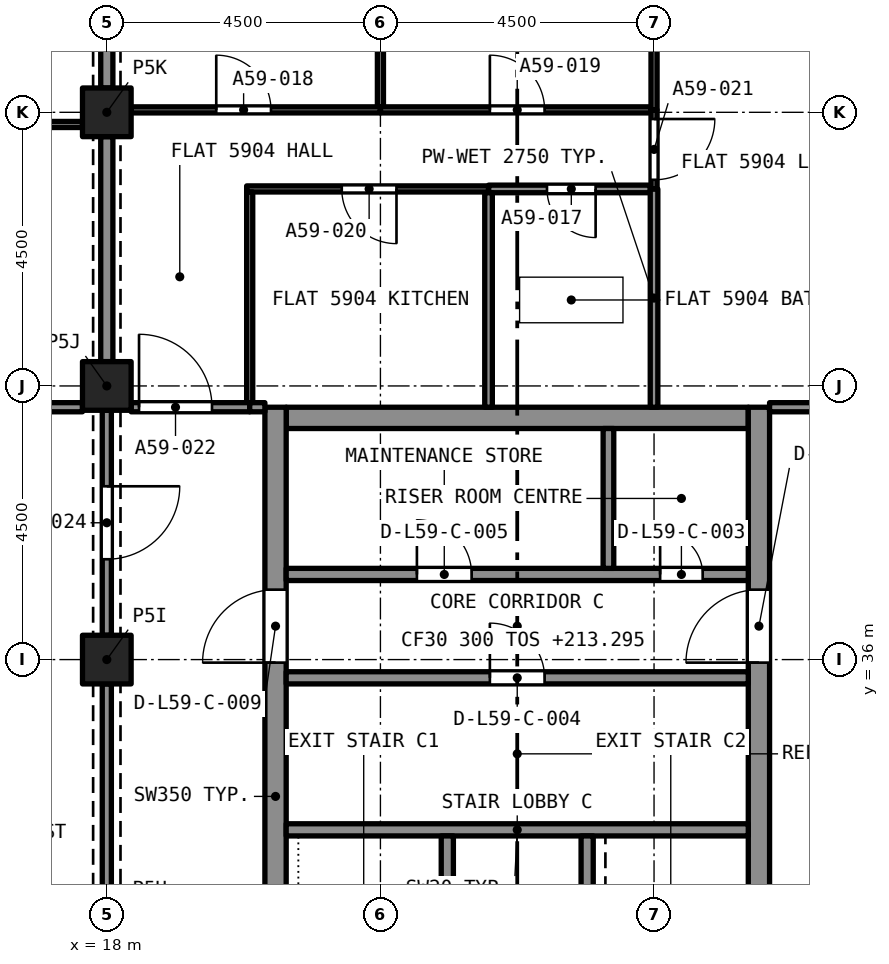
"""IFC4 building model, lengths in metres.
Left out: names, types, materials, properties, quantities, classifications, styles, units other than length and angle.
Written with IfcOpenShell. Run it as: python <this file> out.ifc"""

import sys

from ifc_helpers import new_model, si_unit, direction, frame, frame_2d, origin, origin_2d, place, context, subcontext, project, spatial, rectangle, extrude, element, fill, save


model = new_model("IFC4")
c1 = context("Model", 3, precision=1e-05, world=origin(), true_north=direction((0.0, 1.0)))
c2 = subcontext(c1, "Body", "Model", "MODEL_VIEW")
j1 = project(units=[si_unit("LENGTHUNIT", "METRE"), si_unit("PLANEANGLEUNIT", "RADIAN")], contexts=[c1])
p1 = place(None, origin())
s1 = spatial("IfcSite", under=j1, at=p1, CompositionType="ELEMENT")
p2 = place(p1, origin())
s2 = spatial("IfcBuilding", under=s1, at=p2, CompositionType="ELEMENT")
p3 = place(p2, frame((0.0, 0.0, 213.295)))
s3 = spatial("IfcBuildingStorey", under=s2, at=p3, CompositionType="ELEMENT", Elevation=213.295)
for number, where, z_axis, x_axis in (
    (1, (18.0, 36.0, 0.0), (0.0, 0.0, 1.0), (1.0, 0.0, 0.0)),
    (2, (18.0, 40.5, 0.0), (0.0, 0.0, 1.0), (1.0, 0.0, 0.0)),
    (3, (18.0, 45.0, 0.0), (0.0, 0.0, 1.0), (1.0, 0.0, 0.0)),
):
    element("IfcColumn", number, at=place(p3, frame(where, z_axis=z_axis, x_axis=x_axis)), inside=s3, PredefinedType="COLUMN", context=c2, shape_type="SweptSolid", body=[
        extrude(rectangle(XDim=0.8, YDim=0.8, at=origin_2d()), origin(), (0.0, 0.0, 1.0), 3.2),
    ])
p4 = place(p3, frame((20.95, 39.975, 0.0), z_axis=(0.0, 0.0, 1.0), x_axis=(1.0, 0.0, 0.0)))
e4 = element("IfcWall", 4, at=p4, inside=s3, PredefinedType="SOLIDWALL", context=c2, shape_type="SweptSolid", body=[
    extrude(rectangle(XDim=7.6, YDim=0.35, at=frame_2d((3.8, 0.0))), origin(), (0.0, 0.0, 1.0), 3.2),
])
p5 = place(p3, frame((20.775, 27.35, 0.0), z_axis=(0.0, 0.0, 1.0), x_axis=(0.0, 1.0, 0.0)))
e5 = element("IfcWall", 5, at=p5, inside=s3, PredefinedType="SOLIDWALL", context=c2, shape_type="SweptSolid", body=[
    extrude(rectangle(XDim=12.8, YDim=0.35, at=frame_2d((6.4, 0.0))), origin(), (0.0, 0.0, 1.0), 3.2),
])
p6 = place(p5, frame((8.6, 0.0, 0.0)))
e6 = element("IfcOpeningElement", 6, at=p6, cuts=e5, PredefinedType="OPENING", context=c2, shape_type="SweptSolid", body=[
    extrude(rectangle(XDim=1.2, YDim=2.1, at=frame_2d((0.6, 1.05))), frame((0.0, 0.185, 0.0), z_axis=(0.0, -1.0, 0.0), x_axis=(1.0, 0.0, 0.0)), (0.0, 0.0, 1.0), 0.37),
])
p7 = place(p3, frame((28.725, 27.35, 0.0), z_axis=(0.0, 0.0, 1.0), x_axis=(0.0, 1.0, 0.0)))
e7 = element("IfcWall", 7, at=p7, inside=s3, PredefinedType="SOLIDWALL", context=c2, shape_type="SweptSolid", body=[
    extrude(rectangle(XDim=12.8, YDim=0.35, at=frame_2d((6.4, 0.0))), origin(), (0.0, 0.0, 1.0), 3.2),
])
p8 = place(p7, frame((8.6, 0.0, 0.0)))
e8 = element("IfcOpeningElement", 8, at=p8, cuts=e7, PredefinedType="OPENING", context=c2, shape_type="SweptSolid", body=[
    extrude(rectangle(XDim=1.2, YDim=2.1, at=frame_2d((0.6, 1.05))), frame((0.0, 0.185, 0.0), z_axis=(0.0, -1.0, 0.0), x_axis=(1.0, 0.0, 0.0)), (0.0, 0.0, 1.0), 0.37),
])
p9 = place(p3, frame((13.5, 44.8, 0.0), z_axis=(0.0, 0.0, 1.0), x_axis=(1.0, 0.0, 0.0)))
e9 = element("IfcWall", 9, at=p9, inside=s3, PredefinedType="PARTITIONING", context=c2, shape_type="SweptSolid", body=[
    extrude(rectangle(XDim=4.1, YDim=0.1, at=frame_2d((2.05, 0.0))), origin(), (0.0, 0.0, 1.0), 2.9),
])
p10 = place(p9, frame((1.8, 0.0, 0.0)))
e10 = element("IfcOpeningElement", 10, at=p10, cuts=e9, PredefinedType="OPENING", context=c2, shape_type="SweptSolid", body=[
    extrude(rectangle(XDim=0.9, YDim=2.1, at=frame_2d((0.45, 1.05))), frame((0.0, 0.06, 0.0), z_axis=(0.0, -1.0, 0.0), x_axis=(1.0, 0.0, 0.0)), (0.0, 0.0, 1.0), 0.12),
])
for number, where, z_axis, x_axis in (
    (11, (18.0, 45.4, 0.0), (0.0, 0.0, 1.0), (0.0, 1.0, 0.0)),
    (12, (18.0, 40.9, 0.0), (0.0, 0.0, 1.0), (0.0, 1.0, 0.0)),
):
    element("IfcWall", number, at=place(p3, frame(where, z_axis=z_axis, x_axis=x_axis)), inside=s3, PredefinedType="PARTITIONING", context=c2, shape_type="SweptSolid", body=[
        extrude(rectangle(XDim=3.7, YDim=0.2, at=frame_2d((1.85, 0.0))), origin(), (0.0, 0.0, 1.0), 2.38),
    ])
p11 = place(p3, frame((14.95, 40.15, 0.0), z_axis=(0.0, 0.0, 1.0), x_axis=(1.0, 0.0, 0.0)))
e13 = element("IfcWall", 13, at=p11, inside=s3, PredefinedType="PARTITIONING", context=c2, shape_type="SweptSolid", body=[
    extrude(rectangle(XDim=2.65, YDim=0.15, at=frame_2d((1.325, 0.0))), origin(), (0.0, 0.0, 1.0), 2.9),
])
p12 = place(p11, frame((0.2, 0.0, 0.0)))
e14 = element("IfcOpeningElement", 14, at=p12, cuts=e13, PredefinedType="OPENING", context=c2, shape_type="SweptSolid", body=[
    extrude(rectangle(XDim=1.2, YDim=2.4, at=frame_2d((0.6, 1.2))), frame((0.0, 0.085, 0.0), z_axis=(0.0, -1.0, 0.0), x_axis=(1.0, 0.0, 0.0)), (0.0, 0.0, 1.0), 0.17),
])
p13 = place(p3, frame((26.938, 43.74, 0.0), z_axis=(0.0, 0.0, 1.0), x_axis=(-1.0, 0.0, 0.0)))
e15 = element("IfcWall", 15, at=p13, inside=s3, PredefinedType="PARTITIONING", context=c2, shape_type="SweptSolid", body=[
    extrude(rectangle(XDim=2.659, YDim=0.125, at=frame_2d((1.33, 0.0))), origin(), (0.0, 0.0, 1.0), 2.75),
])
p14 = place(p13, frame((0.898, 0.0, 0.0)))
e16 = element("IfcOpeningElement", 16, at=p14, cuts=e15, PredefinedType="OPENING", context=c2, shape_type="SweptSolid", body=[
    extrude(rectangle(XDim=0.8, YDim=2.1, at=frame_2d((0.4, 1.05))), frame((0.0, 0.073, 0.0), z_axis=(0.0, -1.0, 0.0), x_axis=(1.0, 0.0, 0.0)), (0.0, 0.0, 1.0), 0.145),
])
p15 = place(p3, frame((24.278, 40.15, 0.0), z_axis=(0.0, 0.0, 1.0), x_axis=(0.0, 1.0, 0.0)))
e17 = element("IfcWall", 17, at=p15, inside=s3, PredefinedType="PARTITIONING", context=c2, shape_type="SweptSolid", body=[
    extrude(rectangle(XDim=3.528, YDim=0.125, at=frame_2d((1.764, 0.0))), origin(), (0.0, 0.0, 1.0), 2.75),
])
p16 = place(p3, frame((27.0, 40.15, 0.0), z_axis=(0.0, 0.0, 1.0), x_axis=(0.0, 1.0, 0.0)))
e18 = element("IfcWall", 18, at=p16, inside=s3, PredefinedType="PARTITIONING", context=c2, shape_type="SweptSolid", body=[
    extrude(rectangle(XDim=3.59, YDim=0.125, at=frame_2d((1.795, 0.0))), origin(), (0.0, 0.0, 1.0), 2.75),
])
p17 = place(p3, frame((22.5, 45.09, 0.0), z_axis=(0.0, 0.0, 1.0), x_axis=(0.0, 1.0, 0.0)))
e19 = element("IfcWall", 19, at=p17, inside=s3, PredefinedType="PARTITIONING", context=c2, shape_type="SweptSolid", body=[
    extrude(rectangle(XDim=4.01, YDim=0.1, at=frame_2d((2.005, 0.0))), origin(), (0.0, 0.0, 1.0), 2.75),
])
p18 = place(p3, frame((18.4, 45.04, 0.0), z_axis=(0.0, 0.0, 1.0), x_axis=(1.0, 0.0, 0.0)))
e20 = element("IfcWall", 20, at=p18, inside=s3, PredefinedType="PARTITIONING", context=c2, shape_type="SweptSolid", body=[
    extrude(rectangle(XDim=4.1, YDim=0.1, at=frame_2d((2.05, 0.0))), origin(), (0.0, 0.0, 1.0), 2.75),
])
p19 = place(p18, frame((1.4, 0.0, 0.0)))
e21 = element("IfcOpeningElement", 21, at=p19, cuts=e20, PredefinedType="OPENING", context=c2, shape_type="SweptSolid", body=[
    extrude(rectangle(XDim=0.9, YDim=2.1, at=frame_2d((0.45, 1.05))), frame((0.0, 0.06, 0.0), z_axis=(0.0, -1.0, 0.0), x_axis=(1.0, 0.0, 0.0)), (0.0, 0.0, 1.0), 0.12),
])
p20 = place(p3, frame((22.5, 45.04, 0.0), z_axis=(0.0, 0.0, 1.0), x_axis=(1.0, 0.0, 0.0)))
e22 = element("IfcWall", 22, at=p20, inside=s3, PredefinedType="PARTITIONING", context=c2, shape_type="SweptSolid", body=[
    extrude(rectangle(XDim=4.45, YDim=0.1, at=frame_2d((2.225, 0.0))), origin(), (0.0, 0.0, 1.0), 2.75),
])
p21 = place(p20, frame((1.8, 0.0, 0.0)))
e23 = element("IfcOpeningElement", 23, at=p21, cuts=e22, PredefinedType="OPENING", context=c2, shape_type="SweptSolid", body=[
    extrude(rectangle(XDim=0.9, YDim=2.1, at=frame_2d((0.45, 1.05))), frame((0.0, 0.06, 0.0), z_axis=(0.0, -1.0, 0.0), x_axis=(1.0, 0.0, 0.0)), (0.0, 0.0, 1.0), 0.12),
])
p22 = place(p3, frame((27.0, 45.04, 0.0), z_axis=(0.0, 0.0, 1.0), x_axis=(0.0, 1.0, 0.0)))
e24 = element("IfcWall", 24, at=p22, inside=s3, PredefinedType="PARTITIONING", context=c2, shape_type="SweptSolid", body=[
    extrude(rectangle(XDim=4.027, YDim=0.1, at=frame_2d((2.014, 0.0))), origin(), (0.0, 0.0, 1.0), 2.75),
])
p23 = place(p3, frame((24.278, 43.74, 0.0), z_axis=(0.0, 0.0, 1.0), x_axis=(-1.0, 0.0, 0.0)))
e25 = element("IfcWall", 25, at=p23, inside=s3, PredefinedType="PARTITIONING", context=c2, shape_type="SweptSolid", body=[
    extrude(rectangle(XDim=3.978, YDim=0.1, at=frame_2d((1.989, 0.0))), origin(), (0.0, 0.0, 1.0), 2.75),
])
p24 = place(p23, frame((1.514, 0.0, 0.0)))
e26 = element("IfcOpeningElement", 26, at=p24, cuts=e25, PredefinedType="OPENING", context=c2, shape_type="SweptSolid", body=[
    extrude(rectangle(XDim=0.9, YDim=2.1, at=frame_2d((0.45, 1.05))), frame((0.0, 0.06, 0.0), z_axis=(0.0, -1.0, 0.0), x_axis=(1.0, 0.0, 0.0)), (0.0, 0.0, 1.0), 0.12),
])
p25 = place(p3, frame((20.35, 40.225, 0.0), z_axis=(0.0, 0.0, 1.0), x_axis=(0.0, 1.0, 0.0)))
e27 = element("IfcWall", 27, at=p25, inside=s3, PredefinedType="PARTITIONING", context=c2, shape_type="SweptSolid", body=[
    extrude(rectangle(XDim=3.465, YDim=0.1, at=frame_2d((1.732, 0.0))), origin(), (0.0, 0.0, 1.0), 2.75),
])
p26 = place(p3, frame((27.0, 45.04, 0.0), z_axis=(0.0, 0.0, 1.0), x_axis=(0.0, -1.0, 0.0)))
e28 = element("IfcWall", 28, at=p26, inside=s3, PredefinedType="PARTITIONING", context=c2, shape_type="SweptSolid", body=[
    extrude(rectangle(XDim=1.3, YDim=0.1, at=frame_2d((0.65, 0.0))), origin(), (0.0, 0.0, 1.0), 2.75),
])
p27 = place(p26, frame((0.15, 0.0, 0.0)))
e29 = element("IfcOpeningElement", 29, at=p27, cuts=e28, PredefinedType="OPENING", context=c2, shape_type="SweptSolid", body=[
    extrude(rectangle(XDim=1.0, YDim=2.1, at=frame_2d((0.5, 1.05))), frame((0.0, 0.06, 0.0), z_axis=(0.0, -1.0, 0.0), x_axis=(1.0, 0.0, 0.0)), (0.0, 0.0, 1.0), 0.12),
])
p28 = place(p3, frame((18.4, 40.15, 0.0), z_axis=(0.0, 0.0, 1.0), x_axis=(1.0, 0.0, 0.0)))
e30 = element("IfcWall", 30, at=p28, inside=s3, PredefinedType="PARTITIONING", context=c2, shape_type="SweptSolid", body=[
    extrude(rectangle(XDim=1.95, YDim=0.15, at=frame_2d((0.975, 0.0))), origin(), (0.0, 0.0, 1.0), 2.75),
])
p29 = place(p28, frame((0.13, 0.0, 0.0)))
e31 = element("IfcOpeningElement", 31, at=p29, cuts=e30, PredefinedType="OPENING", context=c2, shape_type="SweptSolid", body=[
    extrude(rectangle(XDim=1.2, YDim=2.4, at=frame_2d((0.6, 1.2))), frame((0.0, 0.085, 0.0), z_axis=(0.0, -1.0, 0.0), x_axis=(1.0, 0.0, 0.0)), (0.0, 0.0, 1.0), 0.17),
])
p30 = place(p3, frame((20.35, 40.15, 0.0), z_axis=(0.0, 0.0, 1.0), x_axis=(1.0, 0.0, 0.0)))
e32 = element("IfcWall", 32, at=p30, inside=s3, PredefinedType="PARTITIONING", context=c2, shape_type="SweptSolid", body=[
    extrude(rectangle(XDim=0.25, YDim=0.15, at=frame_2d((0.125, 0.0))), origin(), (0.0, 0.0, 1.0), 2.75),
])
p31 = place(p3, frame((28.9, 40.15, 0.0), z_axis=(0.0, 0.0, 1.0), x_axis=(1.0, 0.0, 0.0)))
e33 = element("IfcWall", 33, at=p31, inside=s3, PredefinedType="PARTITIONING", context=c2, shape_type="SweptSolid", body=[
    extrude(rectangle(XDim=2.2, YDim=0.15, at=frame_2d((1.1, 0.0))), origin(), (0.0, 0.0, 1.0), 2.75),
])
p32 = place(p3, frame((18.0, 31.9, 0.0), z_axis=(0.0, 0.0, 1.0), x_axis=(0.0, 1.0, 0.0)))
e34 = element("IfcWall", 34, at=p32, inside=s3, PredefinedType="PARTITIONING", context=c2, shape_type="SweptSolid", body=[
    extrude(rectangle(XDim=3.7, YDim=0.15, at=frame_2d((1.85, 0.0))), origin(), (0.0, 0.0, 1.0), 2.38),
])
p33 = place(p3, frame((18.0, 40.1, 0.0), z_axis=(0.0, 0.0, 1.0), x_axis=(0.0, -1.0, 0.0)))
e35 = element("IfcWall", 35, at=p33, inside=s3, PredefinedType="PARTITIONING", context=c2, shape_type="SweptSolid", body=[
    extrude(rectangle(XDim=3.7, YDim=0.15, at=frame_2d((1.85, 0.0))), origin(), (0.0, 0.0, 1.0), 2.38),
])
p34 = place(p33, frame((1.25, 0.0, 0.0)))
e36 = element("IfcOpeningElement", 36, at=p34, cuts=e35, PredefinedType="OPENING", context=c2, shape_type="SweptSolid", body=[
    extrude(rectangle(XDim=1.2, YDim=2.1, at=frame_2d((0.6, 1.05))), frame((0.0, 0.085, 0.0), z_axis=(0.0, -1.0, 0.0), x_axis=(1.0, 0.0, 0.0)), (0.0, 0.0, 1.0), 0.17),
])
p35 = place(p3, frame((20.95, 33.2, 0.0), z_axis=(0.0, 0.0, 1.0), x_axis=(1.0, 0.0, 0.0)))
e37 = element("IfcWall", 37, at=p35, inside=s3, PredefinedType="SOLIDWALL", context=c2, shape_type="SweptSolid", body=[
    extrude(rectangle(XDim=7.6, YDim=0.2, at=frame_2d((3.8, 0.0))), origin(), (0.0, 0.0, 1.0), 2.9),
])
p36 = place(p3, frame((20.95, 35.7, 0.0), z_axis=(0.0, 0.0, 1.0), x_axis=(1.0, 0.0, 0.0)))
e38 = element("IfcWall", 38, at=p36, inside=s3, PredefinedType="SOLIDWALL", context=c2, shape_type="SweptSolid", body=[
    extrude(rectangle(XDim=7.6, YDim=0.2, at=frame_2d((3.8, 0.0))), origin(), (0.0, 0.0, 1.0), 2.9),
])
p37 = place(p36, frame((3.35, 0.0, 0.0)))
e39 = element("IfcOpeningElement", 39, at=p37, cuts=e38, PredefinedType="OPENING", context=c2, shape_type="SweptSolid", body=[
    extrude(rectangle(XDim=0.9, YDim=2.1, at=frame_2d((0.45, 1.05))), frame((0.0, 0.11, 0.0), z_axis=(0.0, -1.0, 0.0), x_axis=(1.0, 0.0, 0.0)), (0.0, 0.0, 1.0), 0.22),
])
p38 = place(p3, frame((20.95, 37.4, 0.0), z_axis=(0.0, 0.0, 1.0), x_axis=(1.0, 0.0, 0.0)))
e40 = element("IfcWall", 40, at=p38, inside=s3, PredefinedType="SOLIDWALL", context=c2, shape_type="SweptSolid", body=[
    extrude(rectangle(XDim=7.6, YDim=0.2, at=frame_2d((3.8, 0.0))), origin(), (0.0, 0.0, 1.0), 2.9),
])
p39 = place(p38, frame((6.15, 0.0, 0.0)))
e41 = element("IfcOpeningElement", 41, at=p39, cuts=e40, PredefinedType="OPENING", context=c2, shape_type="SweptSolid", body=[
    extrude(rectangle(XDim=0.7, YDim=2.1, at=frame_2d((0.35, 1.05))), frame((0.0, 0.11, 0.0), z_axis=(0.0, -1.0, 0.0), x_axis=(1.0, 0.0, 0.0)), (0.0, 0.0, 1.0), 0.22),
])
p40 = place(p38, frame((2.15, 0.0, 0.0)))
e42 = element("IfcOpeningElement", 42, at=p40, cuts=e40, PredefinedType="OPENING", context=c2, shape_type="SweptSolid", body=[
    extrude(rectangle(XDim=0.9, YDim=2.1, at=frame_2d((0.45, 1.05))), frame((0.0, 0.11, 0.0), z_axis=(0.0, -1.0, 0.0), x_axis=(1.0, 0.0, 0.0)), (0.0, 0.0, 1.0), 0.22),
])
p41 = place(p3, frame((23.6, 27.7, 0.0), z_axis=(0.0, 0.0, 1.0), x_axis=(0.0, 1.0, 0.0)))
e43 = element("IfcWall", 43, at=p41, inside=s3, PredefinedType="SOLIDWALL", context=c2, shape_type="SweptSolid", body=[
    extrude(rectangle(XDim=5.4, YDim=0.2, at=frame_2d((2.7, 0.0))), origin(), (0.0, 0.0, 1.0), 2.9),
])
p42 = place(p41, frame((0.2, 0.0, 0.0)))
e44 = element("IfcOpeningElement", 44, at=p42, cuts=e43, PredefinedType="OPENING", context=c2, shape_type="SweptSolid", body=[
    extrude(rectangle(XDim=0.9, YDim=2.1, at=frame_2d((0.45, 1.05))), frame((0.0, 0.11, 0.0), z_axis=(0.0, -1.0, 0.0), x_axis=(1.0, 0.0, 0.0)), (0.0, 0.0, 1.0), 0.22),
])
p43 = place(p3, frame((25.9, 27.7, 0.0), z_axis=(0.0, 0.0, 1.0), x_axis=(0.0, 1.0, 0.0)))
e45 = element("IfcWall", 45, at=p43, inside=s3, PredefinedType="SOLIDWALL", context=c2, shape_type="SweptSolid", body=[
    extrude(rectangle(XDim=5.4, YDim=0.2, at=frame_2d((2.7, 0.0))), origin(), (0.0, 0.0, 1.0), 2.9),
])
p44 = place(p43, frame((0.2, 0.0, 0.0)))
e46 = element("IfcOpeningElement", 46, at=p44, cuts=e45, PredefinedType="OPENING", context=c2, shape_type="SweptSolid", body=[
    extrude(rectangle(XDim=0.9, YDim=2.1, at=frame_2d((0.45, 1.05))), frame((0.0, 0.11, 0.0), z_axis=(0.0, -1.0, 0.0), x_axis=(1.0, 0.0, 0.0)), (0.0, 0.0, 1.0), 0.22),
])
p45 = place(p3, frame((26.25, 37.5, 0.0), z_axis=(0.0, 0.0, 1.0), x_axis=(0.0, 1.0, 0.0)))
e47 = element("IfcWall", 47, at=p45, inside=s3, PredefinedType="SOLIDWALL", context=c2, shape_type="SweptSolid", body=[
    extrude(rectangle(XDim=2.3, YDim=0.175, at=frame_2d((1.15, 0.0))), origin(), (0.0, 0.0, 1.0), 2.9),
])
p46 = place(p14, origin())
e48 = element("IfcDoor", 48, at=p46, inside=s3, OperationType="SINGLE_SWING_LEFT", PredefinedType="DOOR", context=c2, shape_type="SweptSolid", body=[
    extrude(rectangle(XDim=0.8, YDim=2.1, at=frame_2d((0.4, 1.05))), frame((0.0, 0.025, 0.0), z_axis=(0.0, -1.0, 0.0), x_axis=(1.0, 0.0, 0.0)), (0.0, 0.0, 1.0), 0.05),
])
fill(e16, e48)
p47 = place(p19, origin())
e49 = element("IfcDoor", 49, at=p47, inside=s3, OperationType="SINGLE_SWING_LEFT", PredefinedType="DOOR", context=c2, shape_type="SweptSolid", body=[
    extrude(rectangle(XDim=0.9, YDim=2.1, at=frame_2d((0.45, 1.05))), frame((0.0, 0.025, 0.0), z_axis=(0.0, -1.0, 0.0), x_axis=(1.0, 0.0, 0.0)), (0.0, 0.0, 1.0), 0.05),
])
fill(e21, e49)
p48 = place(p21, origin())
e50 = element("IfcDoor", 50, at=p48, inside=s3, OperationType="SINGLE_SWING_RIGHT", PredefinedType="DOOR", context=c2, shape_type="SweptSolid", body=[
    extrude(rectangle(XDim=0.9, YDim=2.1, at=frame_2d((0.45, 1.05))), frame((0.0, 0.025, 0.0), z_axis=(0.0, -1.0, 0.0), x_axis=(1.0, 0.0, 0.0)), (0.0, 0.0, 1.0), 0.05),
])
fill(e23, e50)
p49 = place(p24, origin())
e51 = element("IfcDoor", 51, at=p49, inside=s3, OperationType="SINGLE_SWING_LEFT", PredefinedType="DOOR", context=c2, shape_type="SweptSolid", body=[
    extrude(rectangle(XDim=0.9, YDim=2.1, at=frame_2d((0.45, 1.05))), frame((0.0, 0.025, 0.0), z_axis=(0.0, -1.0, 0.0), x_axis=(1.0, 0.0, 0.0)), (0.0, 0.0, 1.0), 0.05),
])
fill(e26, e51)
p50 = place(p27, origin())
e52 = element("IfcDoor", 52, at=p50, inside=s3, OperationType="SINGLE_SWING_RIGHT", PredefinedType="DOOR", context=c2, shape_type="SweptSolid", body=[
    extrude(rectangle(XDim=1.0, YDim=2.1, at=frame_2d((0.5, 1.05))), frame((0.0, 0.025, 0.0), z_axis=(0.0, -1.0, 0.0), x_axis=(1.0, 0.0, 0.0)), (0.0, 0.0, 1.0), 0.05),
])
fill(e29, e52)
p51 = place(p29, origin())
e53 = element("IfcDoor", 53, at=p51, inside=s3, OperationType="SINGLE_SWING_LEFT", PredefinedType="DOOR", context=c2, shape_type="SweptSolid", body=[
    extrude(rectangle(XDim=1.2, YDim=2.4, at=frame_2d((0.6, 1.2))), frame((0.0, 0.025, 0.0), z_axis=(0.0, -1.0, 0.0), x_axis=(1.0, 0.0, 0.0)), (0.0, 0.0, 1.0), 0.05),
])
fill(e31, e53)
p52 = place(p34, origin())
e54 = element("IfcDoor", 54, at=p52, inside=s3, OperationType="SINGLE_SWING_LEFT", PredefinedType="DOOR", context=c2, shape_type="SweptSolid", body=[
    extrude(rectangle(XDim=1.2, YDim=2.1, at=frame_2d((0.6, 1.05))), frame((0.0, 0.025, 0.0), z_axis=(0.0, -1.0, 0.0), x_axis=(1.0, 0.0, 0.0)), (0.0, 0.0, 1.0), 0.05),
])
fill(e36, e54)
p53 = place(p39, origin())
e55 = element("IfcDoor", 55, at=p53, inside=s3, OperationType="SINGLE_SWING_LEFT", PredefinedType="DOOR", context=c2, shape_type="SweptSolid", body=[
    extrude(rectangle(XDim=0.7, YDim=2.1, at=frame_2d((0.35, 1.05))), frame((0.0, 0.025, 0.0), z_axis=(0.0, -1.0, 0.0), x_axis=(1.0, 0.0, 0.0)), (0.0, 0.0, 1.0), 0.05),
])
fill(e41, e55)
p54 = place(p37, origin())
e56 = element("IfcDoor", 56, at=p54, inside=s3, OperationType="SINGLE_SWING_LEFT", PredefinedType="DOOR", context=c2, shape_type="SweptSolid", body=[
    extrude(rectangle(XDim=0.9, YDim=2.1, at=frame_2d((0.45, 1.05))), frame((0.0, 0.025, 0.0), z_axis=(0.0, -1.0, 0.0), x_axis=(1.0, 0.0, 0.0)), (0.0, 0.0, 1.0), 0.05),
])
fill(e39, e56)
p55 = place(p40, origin())
e57 = element("IfcDoor", 57, at=p55, inside=s3, OperationType="SINGLE_SWING_LEFT", PredefinedType="DOOR", context=c2, shape_type="SweptSolid", body=[
    extrude(rectangle(XDim=0.9, YDim=2.1, at=frame_2d((0.45, 1.05))), frame((0.0, 0.025, 0.0), z_axis=(0.0, -1.0, 0.0), x_axis=(1.0, 0.0, 0.0)), (0.0, 0.0, 1.0), 0.05),
])
fill(e42, e57)
p56 = place(p6, origin())
e58 = element("IfcDoor", 58, at=p56, inside=s3, OperationType="SINGLE_SWING_LEFT", PredefinedType="DOOR", context=c2, shape_type="SweptSolid", body=[
    extrude(rectangle(XDim=1.2, YDim=2.1, at=frame_2d((0.6, 1.05))), frame((0.0, 0.025, 0.0), z_axis=(0.0, -1.0, 0.0), x_axis=(1.0, 0.0, 0.0)), (0.0, 0.0, 1.0), 0.05),
])
fill(e6, e58)
p57 = place(p8, origin())
e59 = element("IfcDoor", 59, at=p57, inside=s3, OperationType="SINGLE_SWING_LEFT", PredefinedType="DOOR", context=c2, shape_type="SweptSolid", body=[
    extrude(rectangle(XDim=1.2, YDim=2.1, at=frame_2d((0.6, 1.05))), frame((0.0, 0.025, 0.0), z_axis=(0.0, -1.0, 0.0), x_axis=(1.0, 0.0, 0.0)), (0.0, 0.0, 1.0), 0.05),
])
fill(e8, e59)
save(model, sys.argv[1])
